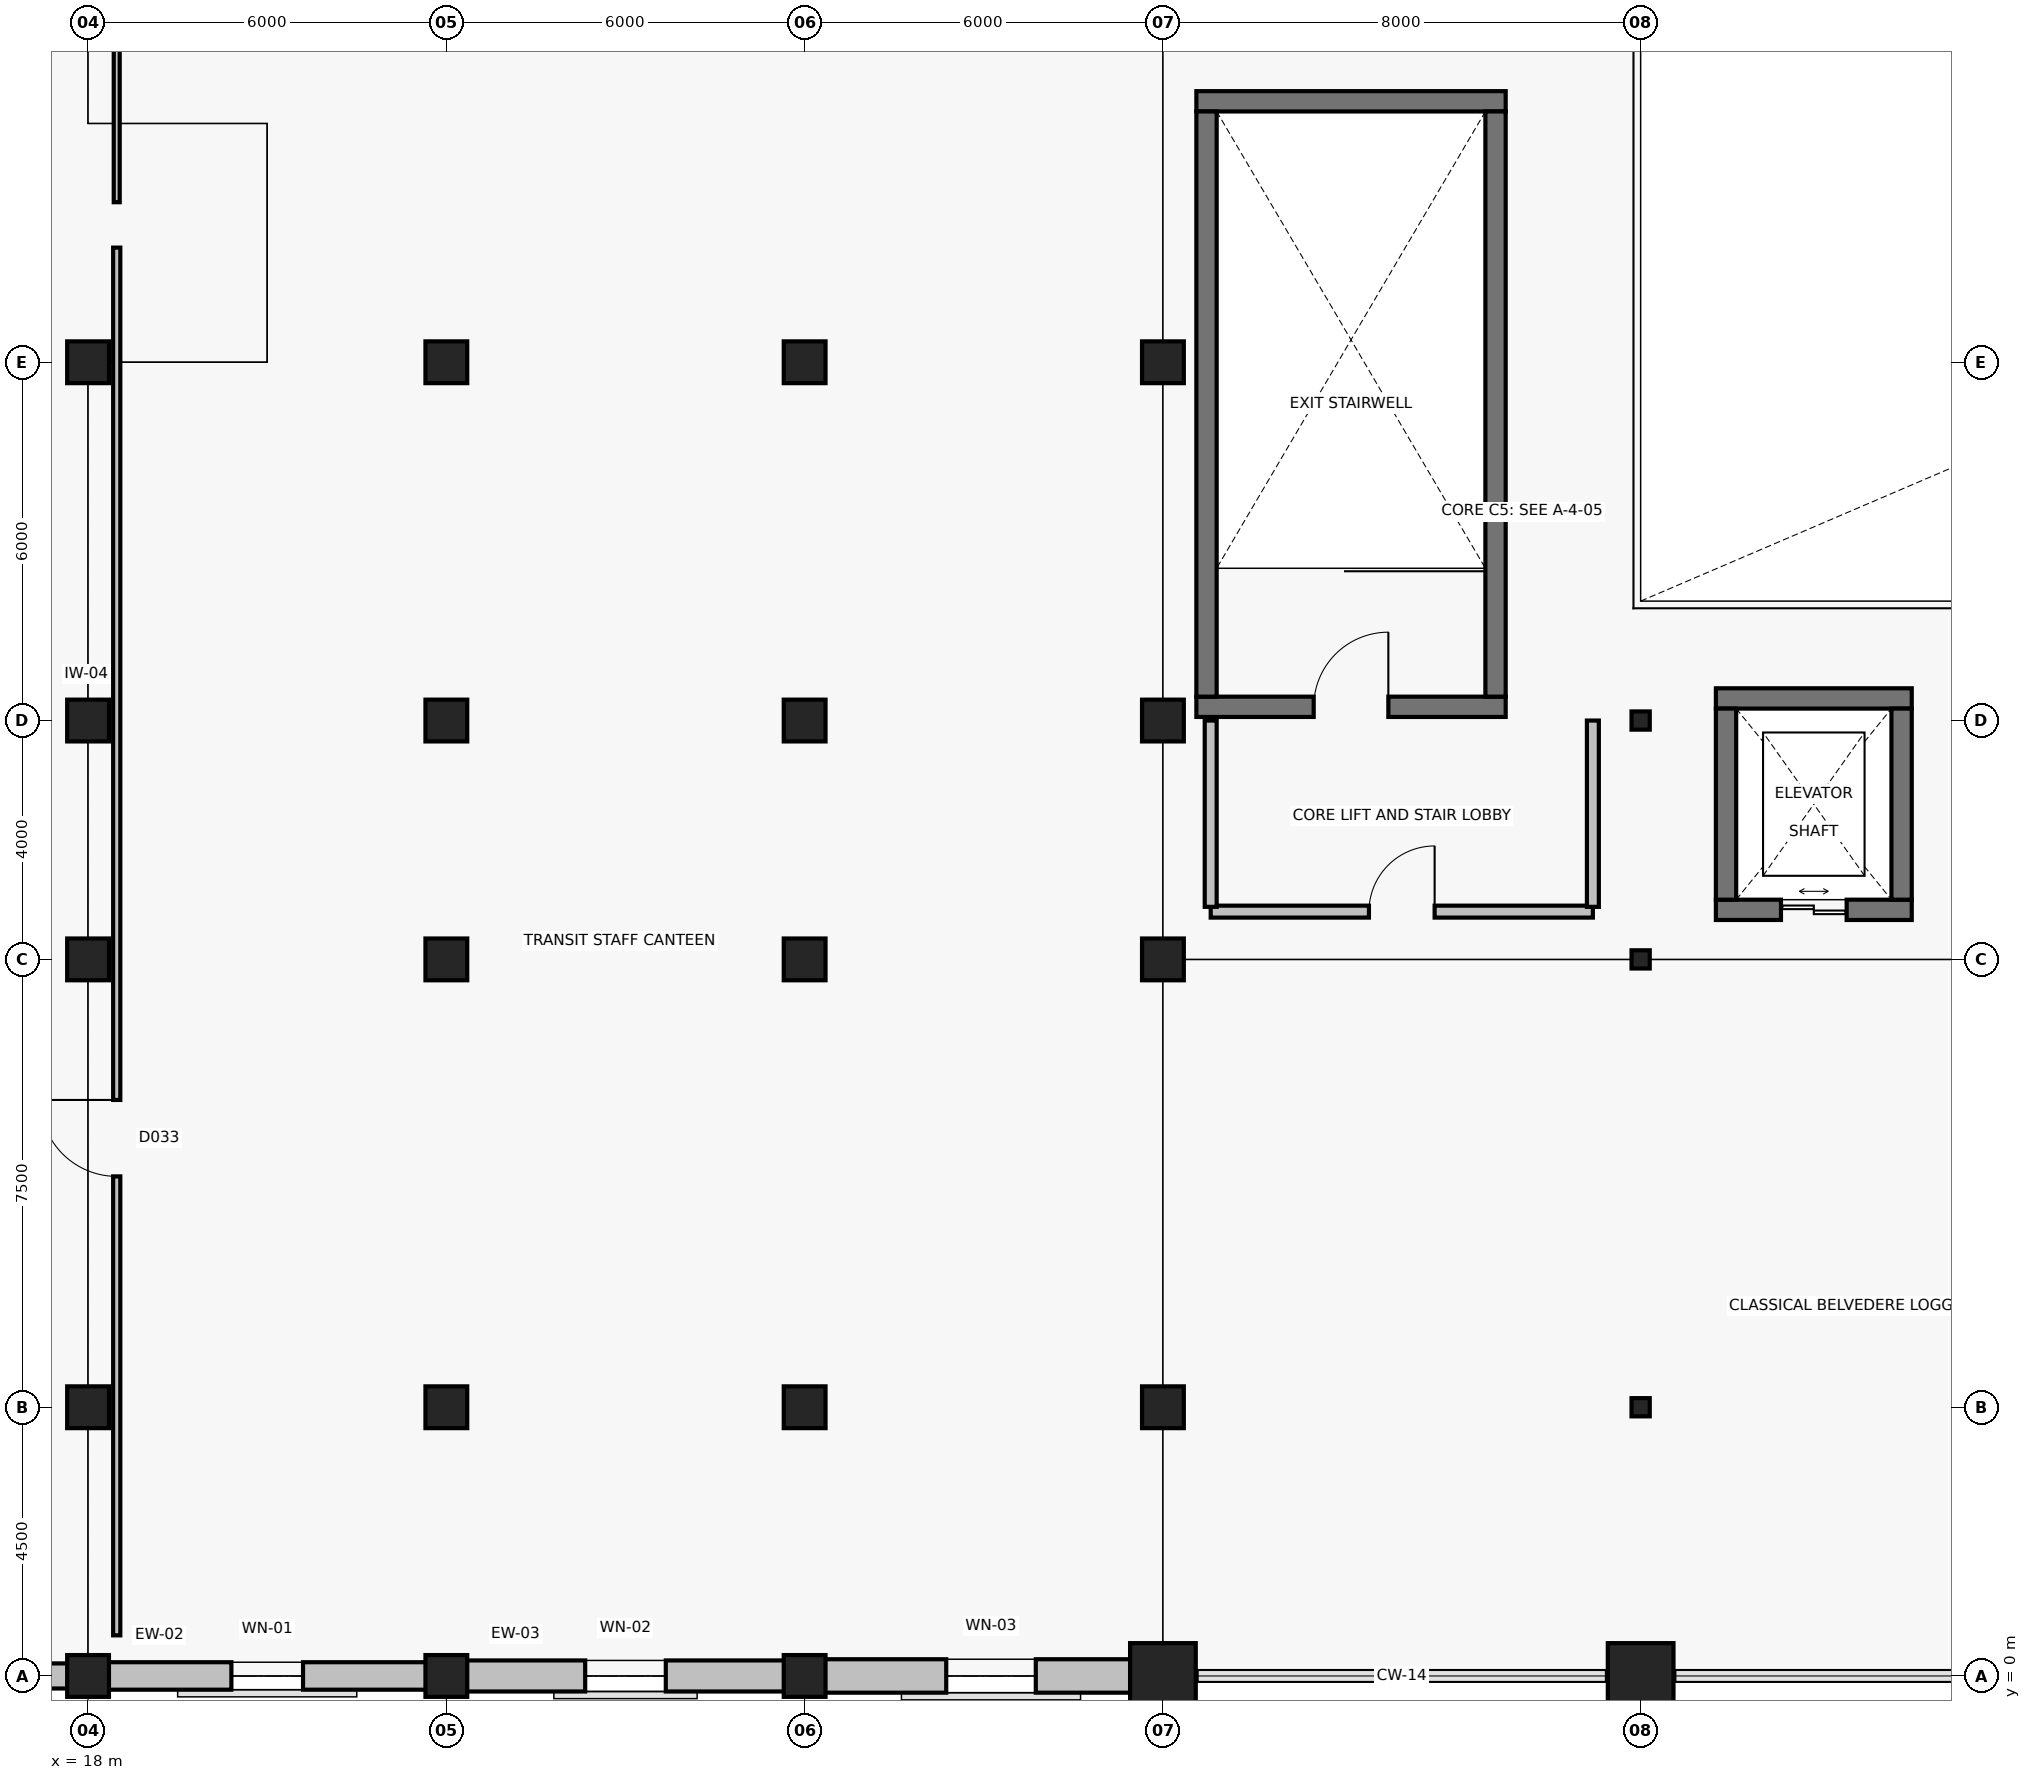
"""IFC4 building model, lengths in metres.
Left out: names, types, materials, properties, quantities, classifications, styles, units other than length and angle.
Written with IfcOpenShell. Run it as: python <this file> out.ifc"""

import sys

from ifc_helpers import new_model, si_unit, direction, frame, frame_2d, origin, origin_2d, place, context, subcontext, project, spatial, rectangle, hollow_rectangle, circle, extrude, element, fill, save


model = new_model("IFC4")
c1 = context("Model", 3, precision=1e-05, world=origin(), true_north=direction((0.0, 1.0)))
c2 = subcontext(c1, "Body", "Model", "MODEL_VIEW")
j1 = project(units=[si_unit("LENGTHUNIT", "METRE"), si_unit("PLANEANGLEUNIT", "RADIAN")], contexts=[c1])
p1 = place(None, origin())
s1 = spatial("IfcSite", under=j1, at=p1, CompositionType="ELEMENT")
p2 = place(p1, origin())
s2 = spatial("IfcBuilding", under=s1, at=p2, CompositionType="ELEMENT")
p3 = place(p2, frame((0.0, 0.0, 6.6)))
s3 = spatial("IfcBuildingStorey", under=s2, at=p3, CompositionType="ELEMENT", Elevation=6.6)
for number, where, z_axis, x_axis in (
    (1, (18.0, 0.0, 0.0), (0.0, 0.0, 1.0), (1.0, 0.0, 0.0)),
    (2, (18.0, 4.5, 0.0), (0.0, 0.0, 1.0), (1.0, 0.0, 0.0)),
    (3, (18.0, 12.0, 0.0), (0.0, 0.0, 1.0), (1.0, 0.0, 0.0)),
    (4, (18.0, 16.0, 0.0), (0.0, 0.0, 1.0), (1.0, 0.0, 0.0)),
    (5, (18.0, 22.0, 0.0), (0.0, 0.0, 1.0), (1.0, 0.0, 0.0)),
    (6, (24.0, 0.0, 0.0), (0.0, 0.0, 1.0), (1.0, 0.0, 0.0)),
    (7, (24.0, 4.5, 0.0), (0.0, 0.0, 1.0), (1.0, 0.0, 0.0)),
    (8, (24.0, 12.0, 0.0), (0.0, 0.0, 1.0), (1.0, 0.0, 0.0)),
    (9, (24.0, 16.0, 0.0), (0.0, 0.0, 1.0), (1.0, 0.0, 0.0)),
    (10, (24.0, 22.0, 0.0), (0.0, 0.0, 1.0), (1.0, 0.0, 0.0)),
    (11, (30.0, 0.0, 0.0), (0.0, 0.0, 1.0), (1.0, 0.0, 0.0)),
    (12, (30.0, 4.5, 0.0), (0.0, 0.0, 1.0), (1.0, 0.0, 0.0)),
    (13, (30.0, 12.0, 0.0), (0.0, 0.0, 1.0), (1.0, 0.0, 0.0)),
    (14, (30.0, 16.0, 0.0), (0.0, 0.0, 1.0), (1.0, 0.0, 0.0)),
    (15, (30.0, 22.0, 0.0), (0.0, 0.0, 1.0), (1.0, 0.0, 0.0)),
):
    element("IfcColumn", number, at=place(p3, frame(where, z_axis=z_axis, x_axis=x_axis)), inside=s3, PredefinedType="COLUMN", context=c2, shape_type="SweptSolid", body=[
        extrude(rectangle(XDim=0.7, YDim=0.7, at=origin_2d()), origin(), (0.0, 0.0, 1.0), 4.8),
    ])
p4 = place(p3, frame((36.0, 0.0, 0.0), z_axis=(0.0, 0.0, 1.0), x_axis=(1.0, 0.0, 0.0)))
e16 = element("IfcColumn", 16, at=p4, inside=s3, PredefinedType="COLUMN", context=c2, shape_type="SweptSolid", body=[
    extrude(circle(Radius=0.55, at=origin_2d()), origin(), (0.0, 0.0, 1.0), 4.8),
])
for number, where, z_axis, x_axis in (
    (17, (36.0, 4.5, 0.0), (0.0, 0.0, 1.0), (1.0, 0.0, 0.0)),
    (18, (36.0, 12.0, 0.0), (0.0, 0.0, 1.0), (1.0, 0.0, 0.0)),
    (19, (36.0, 16.0, 0.0), (0.0, 0.0, 1.0), (1.0, 0.0, 0.0)),
    (20, (36.0, 22.0, 0.0), (0.0, 0.0, 1.0), (1.0, 0.0, 0.0)),
):
    element("IfcColumn", number, at=place(p3, frame(where, z_axis=z_axis, x_axis=x_axis)), inside=s3, PredefinedType="COLUMN", context=c2, shape_type="SweptSolid", body=[
        extrude(rectangle(XDim=0.7, YDim=0.7, at=origin_2d()), origin(), (0.0, 0.0, 1.0), 4.8),
    ])
p5 = place(p3, frame((44.0, 0.0, 0.0), z_axis=(0.0, 0.0, 1.0), x_axis=(1.0, 0.0, 0.0)))
e21 = element("IfcColumn", 21, at=p5, inside=s3, PredefinedType="COLUMN", context=c2, shape_type="SweptSolid", body=[
    extrude(circle(Radius=0.55, at=origin_2d()), origin(), (0.0, 0.0, 1.0), 4.8),
])
for number, where, z_axis, x_axis in (
    (22, (44.0, 4.5, 0.0), (0.0, 0.0, 1.0), (1.0, 0.0, 0.0)),
    (23, (44.0, 12.0, 0.0), (0.0, 0.0, 1.0), (1.0, 0.0, 0.0)),
    (24, (44.0, 16.0, 0.0), (0.0, 0.0, 1.0), (1.0, 0.0, 0.0)),
):
    element("IfcColumn", number, at=place(p3, frame(where, z_axis=z_axis, x_axis=x_axis)), inside=s3, PredefinedType="COLUMN", context=c2, shape_type="SweptSolid", body=[
        extrude(hollow_rectangle(XDim=0.305, YDim=0.305, WallThickness=0.013, InnerFilletRadius=0.013, OuterFilletRadius=0.025, at=origin_2d()), origin(), (0.0, 0.0, 1.0), 4.8),
    ])
p6 = place(p3, frame((11.992, 0.0, 0.0), z_axis=(0.0, 0.0, 1.0), x_axis=(1.0, 0.0, 0.0)))
e25 = element("IfcWall", 25, at=p6, inside=s3, PredefinedType="SOLIDWALL", context=c2, shape_type="SweptSolid", body=[
    extrude(rectangle(XDim=6.016, YDim=0.42, at=frame_2d((3.008, 0.0))), origin(), (0.0, 0.0, 1.0), 3.911),
])
p7 = place(p6, frame((1.608, 0.0, 0.9)))
e26 = element("IfcOpeningElement", 26, at=p7, cuts=e25, PredefinedType="OPENING", context=c2, shape_type="SweptSolid", body=[
    extrude(rectangle(XDim=2.8, YDim=2.4, at=frame_2d((1.4, 1.2))), frame((0.0, 0.225, 0.0), z_axis=(0.0, -1.0, 0.0), x_axis=(1.0, 0.0, 0.0)), (0.0, 0.0, 1.0), 0.45),
])
p8 = place(p3, frame((17.992, 0.0, 0.0), z_axis=(0.0, 0.0, 1.0), x_axis=(1.0, 0.0, 0.0)))
e27 = element("IfcWall", 27, at=p8, inside=s3, PredefinedType="SOLIDWALL", context=c2, shape_type="SweptSolid", body=[
    extrude(rectangle(XDim=6.016, YDim=0.46, at=frame_2d((3.008, 0.0))), origin(), (0.0, 0.0, 1.0), 3.911),
])
p9 = place(p8, frame((2.408, 0.0, 0.9)))
e28 = element("IfcOpeningElement", 28, at=p9, cuts=e27, PredefinedType="OPENING", context=c2, shape_type="SweptSolid", body=[
    extrude(rectangle(XDim=1.2, YDim=1.8, at=frame_2d((0.6, 0.9))), frame((0.0, 0.245, 0.0), z_axis=(0.0, -1.0, 0.0), x_axis=(1.0, 0.0, 0.0)), (0.0, 0.0, 1.0), 0.49),
])
p10 = place(p3, frame((23.992, 0.0, 0.0), z_axis=(0.0, 0.0, 1.0), x_axis=(1.0, 0.0, 0.0)))
e29 = element("IfcWall", 29, at=p10, inside=s3, PredefinedType="SOLIDWALL", context=c2, shape_type="SweptSolid", body=[
    extrude(rectangle(XDim=6.016, YDim=0.52, at=frame_2d((3.008, 0.0))), origin(), (0.0, 0.0, 1.0), 3.911),
])
p11 = place(p10, frame((2.333, 0.0, 0.9)))
e30 = element("IfcOpeningElement", 30, at=p11, cuts=e29, PredefinedType="OPENING", context=c2, shape_type="SweptSolid", body=[
    extrude(rectangle(XDim=1.35, YDim=1.8, at=frame_2d((0.675, 0.9))), frame((0.0, 0.275, 0.0), z_axis=(0.0, -1.0, 0.0), x_axis=(1.0, 0.0, 0.0)), (0.0, 0.0, 1.0), 0.55),
])
p12 = place(p3, frame((29.992, 0.0, 0.0), z_axis=(0.0, 0.0, 1.0), x_axis=(1.0, 0.0, 0.0)))
e31 = element("IfcWall", 31, at=p12, inside=s3, PredefinedType="SOLIDWALL", context=c2, shape_type="SweptSolid", body=[
    extrude(rectangle(XDim=6.258, YDim=0.56, at=frame_2d((3.129, 0.0))), origin(), (0.0, 0.0, 1.0), 3.153),
])
p13 = place(p12, frame((2.379, 0.0, 0.9)))
e32 = element("IfcOpeningElement", 32, at=p13, cuts=e31, PredefinedType="OPENING", context=c2, shape_type="SweptSolid", body=[
    extrude(rectangle(XDim=1.5, YDim=1.8, at=frame_2d((0.75, 0.9))), frame((0.0, 0.295, 0.0), z_axis=(0.0, -1.0, 0.0), x_axis=(1.0, 0.0, 0.0)), (0.0, 0.0, 1.0), 0.59),
])
p14 = place(p3, frame((36.56, 16.23, 0.0), z_axis=(0.0, 0.0, 1.0), x_axis=(1.0, 0.0, 0.0)))
e33 = element("IfcWall", 33, at=p14, inside=s3, PredefinedType="SHEAR", context=c2, shape_type="SweptSolid", body=[
    extrude(rectangle(XDim=5.18, YDim=0.34, at=frame_2d((2.59, 0.0))), origin(), (0.0, 0.0, 1.0), 4.54),
])
p15 = place(p14, frame((1.965, 0.0, 0.0)))
e34 = element("IfcOpeningElement", 34, at=p15, cuts=e33, PredefinedType="OPENING", context=c2, shape_type="SweptSolid", body=[
    extrude(rectangle(XDim=1.25, YDim=2.2, at=frame_2d((0.625, 1.1))), frame((0.0, 0.185, 0.0), z_axis=(0.0, -1.0, 0.0), x_axis=(1.0, 0.0, 0.0)), (0.0, 0.0, 1.0), 0.37),
])
p16 = place(p3, frame((41.74, 26.37, 0.0), z_axis=(0.0, 0.0, 1.0), x_axis=(-1.0, 0.0, 0.0)))
e35 = element("IfcWall", 35, at=p16, inside=s3, PredefinedType="SHEAR", context=c2, shape_type="SweptSolid", body=[
    extrude(rectangle(XDim=5.18, YDim=0.34, at=frame_2d((2.59, 0.0))), origin(), (0.0, 0.0, 1.0), 4.54),
])
for number, where, z_axis, x_axis in (
    (36, (36.73, 26.2, 0.0), (0.0, 0.0, 1.0), (0.0, -1.0, 0.0)),
    (37, (41.57, 16.4, 0.0), (0.0, 0.0, 1.0), (0.0, 1.0, 0.0)),
):
    element("IfcWall", number, at=place(p3, frame(where, z_axis=z_axis, x_axis=x_axis)), inside=s3, PredefinedType="SHEAR", context=c2, shape_type="SweptSolid", body=[
        extrude(rectangle(XDim=9.8, YDim=0.34, at=frame_2d((4.9, 0.0))), origin(), (0.0, 0.0, 1.0), 4.54),
    ])
p17 = place(p3, frame((45.26, 12.83, 0.0), z_axis=(0.0, 0.0, 1.0), x_axis=(1.0, 0.0, 0.0)))
e38 = element("IfcWall", 38, at=p17, inside=s3, PredefinedType="SHEAR", context=c2, shape_type="SweptSolid", body=[
    extrude(rectangle(XDim=3.28, YDim=0.34, at=frame_2d((1.64, 0.0))), origin(), (0.0, 0.0, 1.0), 4.54),
])
p18 = place(p17, frame((1.09, 0.0, 0.0)))
e39 = element("IfcOpeningElement", 39, at=p18, cuts=e38, PredefinedType="OPENING", context=c2, shape_type="SweptSolid", body=[
    extrude(rectangle(XDim=1.1, YDim=2.2, at=frame_2d((0.55, 1.1))), frame((0.0, 0.185, 0.0), z_axis=(0.0, -1.0, 0.0), x_axis=(1.0, 0.0, 0.0)), (0.0, 0.0, 1.0), 0.37),
])
p19 = place(p3, frame((48.54, 16.37, 0.0), z_axis=(0.0, 0.0, 1.0), x_axis=(-1.0, 0.0, 0.0)))
e40 = element("IfcWall", 40, at=p19, inside=s3, PredefinedType="SHEAR", context=c2, shape_type="SweptSolid", body=[
    extrude(rectangle(XDim=3.28, YDim=0.34, at=frame_2d((1.64, 0.0))), origin(), (0.0, 0.0, 1.0), 4.54),
])
for number, where, z_axis, x_axis in (
    (41, (45.43, 16.2, 0.0), (0.0, 0.0, 1.0), (0.0, -1.0, 0.0)),
    (42, (48.37, 13.0, 0.0), (0.0, 0.0, 1.0), (0.0, 1.0, 0.0)),
):
    element("IfcWall", number, at=place(p3, frame(where, z_axis=z_axis, x_axis=x_axis)), inside=s3, PredefinedType="SHEAR", context=c2, shape_type="SweptSolid", body=[
        extrude(rectangle(XDim=3.2, YDim=0.34, at=frame_2d((1.6, 0.0))), origin(), (0.0, 0.0, 1.0), 4.54),
    ])
p20 = place(p3, frame((36.8, 12.8, 0.0), z_axis=(0.0, 0.0, 1.0), x_axis=(1.0, 0.0, 0.0)))
e43 = element("IfcWall", 43, at=p20, inside=s3, PredefinedType="PARTITIONING", context=c2, shape_type="SweptSolid", body=[
    extrude(rectangle(XDim=6.4, YDim=0.2, at=frame_2d((3.2, 0.0))), origin(), (0.0, 0.0, 1.0), 4.092),
])
p21 = place(p20, frame((2.65, 0.0, 0.0)))
e44 = element("IfcOpeningElement", 44, at=p21, cuts=e43, PredefinedType="OPENING", context=c2, shape_type="SweptSolid", body=[
    extrude(rectangle(XDim=1.1, YDim=2.15, at=frame_2d((0.55, 1.075))), frame((0.0, 0.115, 0.0), z_axis=(0.0, -1.0, 0.0), x_axis=(1.0, 0.0, 0.0)), (0.0, 0.0, 1.0), 0.23),
])
for number, where, z_axis, x_axis in (
    (45, (36.8, 16.0, 0.0), (0.0, 0.0, 1.0), (0.0, -1.0, 0.0)),
    (46, (43.2, 12.88, 0.0), (0.0, 0.0, 1.0), (0.0, 1.0, 0.0)),
):
    element("IfcWall", number, at=place(p3, frame(where, z_axis=z_axis, x_axis=x_axis)), inside=s3, PredefinedType="PARTITIONING", context=c2, shape_type="SweptSolid", body=[
        extrude(rectangle(XDim=3.12, YDim=0.2, at=frame_2d((1.56, 0.0))), origin(), (0.0, 0.0, 1.0), 3.839),
    ])
p22 = place(p3, frame((18.48, 0.68, 0.0), z_axis=(0.0, 0.0, 1.0), x_axis=(0.0, 1.0, 0.0)))
e47 = element("IfcWall", 47, at=p22, inside=s3, PredefinedType="PARTITIONING", context=c2, shape_type="SweptSolid", body=[
    extrude(rectangle(XDim=23.24, YDim=0.12, at=frame_2d((11.62, 0.0))), origin(), (0.0, 0.0, 1.0), 3.987),
])
p23 = place(p22, frame((7.686, 0.0, 0.0)))
e48 = element("IfcOpeningElement", 48, at=p23, cuts=e47, PredefinedType="OPENING", context=c2, shape_type="SweptSolid", body=[
    extrude(rectangle(XDim=1.28, YDim=2.2, at=frame_2d((0.64, 1.1))), frame((0.0, 0.075, 0.0), z_axis=(0.0, -1.0, 0.0), x_axis=(1.0, 0.0, 0.0)), (0.0, 0.0, 1.0), 0.15),
])
p24 = place(p3, frame((18.48, 24.68, 0.0), z_axis=(0.0, 0.0, 1.0), x_axis=(0.0, 1.0, 0.0)))
e49 = element("IfcWall", 49, at=p24, inside=s3, PredefinedType="PARTITIONING", context=c2, shape_type="SweptSolid", body=[
    extrude(rectangle(XDim=27.24, YDim=0.1, at=frame_2d((13.62, 0.0))), origin(), (0.0, 0.0, 1.0), 3.911),
])
p25 = place(p24, frame((16.822, 0.0, 0.0)))
e50 = element("IfcOpeningElement", 50, at=p25, cuts=e49, PredefinedType="OPENING", context=c2, shape_type="SweptSolid", body=[
    extrude(rectangle(XDim=1.36, YDim=2.2, at=frame_2d((0.68, 1.1))), frame((0.0, 0.065, 0.0), z_axis=(0.0, -1.0, 0.0), x_axis=(1.0, 0.0, 0.0)), (0.0, 0.0, 1.0), 0.13),
])
p26 = place(p9, origin())
e51 = element("IfcWindow", 51, at=p26, inside=s3, PartitioningType="SINGLE_PANEL", PredefinedType="WINDOW", context=c2, shape_type="SweptSolid", body=[
    extrude(rectangle(XDim=1.2, YDim=1.8, at=frame_2d((0.6, 0.9))), frame((0.0, 0.03, 0.0), z_axis=(0.0, -1.0, 0.0), x_axis=(1.0, 0.0, 0.0)), (0.0, 0.0, 1.0), 0.06),
])
fill(e28, e51)
p27 = place(p11, origin())
e52 = element("IfcWindow", 52, at=p27, inside=s3, PartitioningType="SINGLE_PANEL", PredefinedType="WINDOW", context=c2, shape_type="SweptSolid", body=[
    extrude(rectangle(XDim=1.35, YDim=1.8, at=frame_2d((0.675, 0.9))), frame((0.0, 0.03, 0.0), z_axis=(0.0, -1.0, 0.0), x_axis=(1.0, 0.0, 0.0)), (0.0, 0.0, 1.0), 0.06),
])
fill(e30, e52)
p28 = place(p13, origin())
e53 = element("IfcWindow", 53, at=p28, inside=s3, PartitioningType="SINGLE_PANEL", PredefinedType="WINDOW", context=c2, shape_type="SweptSolid", body=[
    extrude(rectangle(XDim=1.5, YDim=1.8, at=frame_2d((0.75, 0.9))), frame((0.0, 0.03, 0.0), z_axis=(0.0, -1.0, 0.0), x_axis=(1.0, 0.0, 0.0)), (0.0, 0.0, 1.0), 0.06),
])
fill(e32, e53)
p29 = place(p15, origin())
e54 = element("IfcDoor", 54, at=p29, inside=s3, OperationType="SINGLE_SWING_RIGHT", PredefinedType="DOOR", context=c2, shape_type="SweptSolid", body=[
    extrude(rectangle(XDim=1.25, YDim=2.2, at=frame_2d((0.625, 1.1))), frame((0.0, 0.025, 0.0), z_axis=(0.0, -1.0, 0.0), x_axis=(1.0, 0.0, 0.0)), (0.0, 0.0, 1.0), 0.05),
])
fill(e34, e54)
p30 = place(p18, origin())
e55 = element("IfcDoor", 55, at=p30, inside=s3, OperationType="DOUBLE_DOOR_SLIDING", PredefinedType="DOOR", context=c2, shape_type="SweptSolid", body=[
    extrude(rectangle(XDim=1.1, YDim=2.2, at=frame_2d((0.55, 1.1))), frame((0.0, 0.025, 0.0), z_axis=(0.0, -1.0, 0.0), x_axis=(1.0, 0.0, 0.0)), (0.0, 0.0, 1.0), 0.05),
])
fill(e39, e55)
p31 = place(p21, origin())
e56 = element("IfcDoor", 56, at=p31, inside=s3, OperationType="SINGLE_SWING_RIGHT", PredefinedType="DOOR", context=c2, shape_type="SweptSolid", body=[
    extrude(rectangle(XDim=1.1, YDim=2.15, at=frame_2d((0.55, 1.075))), frame((0.0, 0.025, 0.0), z_axis=(0.0, -1.0, 0.0), x_axis=(1.0, 0.0, 0.0)), (0.0, 0.0, 1.0), 0.05),
])
fill(e44, e56)
p32 = place(p23, origin())
e57 = element("IfcDoor", 57, at=p32, inside=s3, OperationType="SINGLE_SWING_RIGHT", PredefinedType="DOOR", context=c2, shape_type="SweptSolid", body=[
    extrude(rectangle(XDim=1.28, YDim=2.2, at=frame_2d((0.64, 1.1))), frame((0.0, 0.025, 0.0), z_axis=(0.0, -1.0, 0.0), x_axis=(1.0, 0.0, 0.0)), (0.0, 0.0, 1.0), 0.05),
])
fill(e48, e57)
save(model, sys.argv[1])
